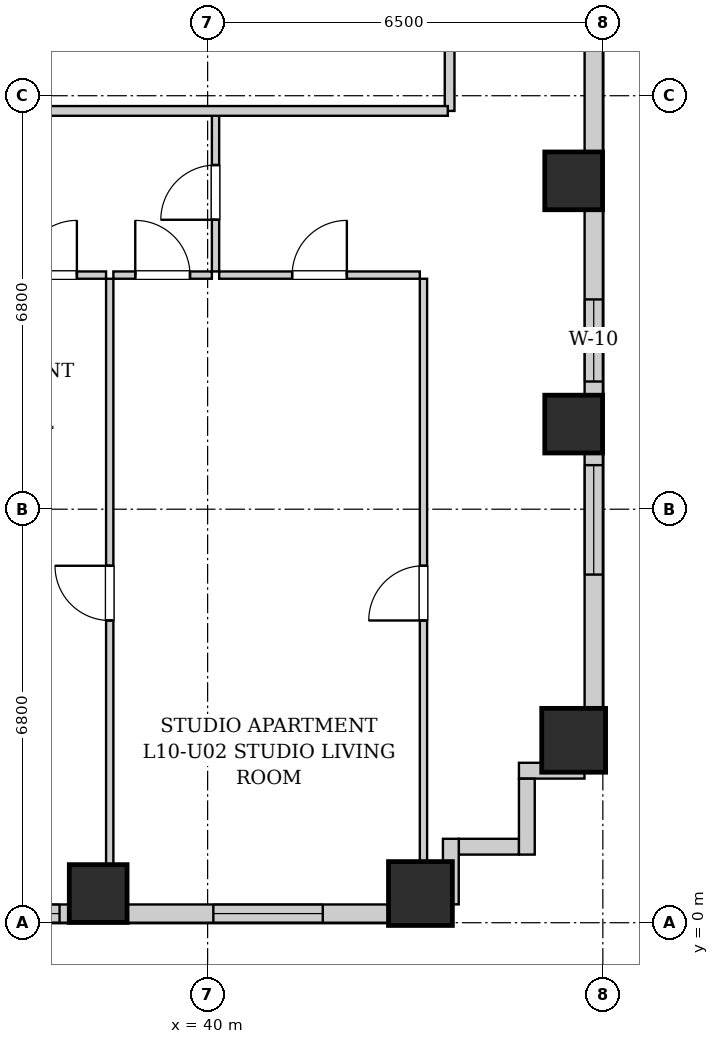
"""IFC4 building model, lengths in metres.
Left out: names, types, materials, properties, quantities, classifications, styles, units other than length and angle.
Written with IfcOpenShell. Run it as: python <this file> out.ifc"""

import sys

from ifc_helpers import new_model, si_unit, direction, frame, frame_2d, origin, origin_2d, place, context, subcontext, project, spatial, rectangle, extrude, element, fill, save


model = new_model("IFC4")
c1 = context("Model", 3, precision=1e-05, world=origin(), true_north=direction((0.0, 1.0)))
c2 = subcontext(c1, "Body", "Model", "MODEL_VIEW")
j1 = project(units=[si_unit("LENGTHUNIT", "METRE"), si_unit("PLANEANGLEUNIT", "RADIAN")], contexts=[c1])
p1 = place(None, origin())
s1 = spatial("IfcSite", under=j1, at=p1, CompositionType="ELEMENT")
p2 = place(p1, origin())
s2 = spatial("IfcBuilding", under=s1, at=p2, CompositionType="ELEMENT")
p3 = place(p2, frame((0.0, 0.0, 41.8)))
s3 = spatial("IfcBuildingStorey", under=s2, at=p3, CompositionType="ELEMENT", Elevation=41.8)
p4 = place(p3, frame((38.2, 0.48, 0.0), z_axis=(0.0, 0.0, 1.0), x_axis=(1.0, 0.0, 0.0)))
e1 = element("IfcColumn", 1, at=p4, inside=s3, PredefinedType="COLUMN", context=c2, shape_type="SweptSolid", body=[
    extrude(rectangle(XDim=0.95, YDim=0.95, at=origin_2d()), origin(), (0.0, 0.0, 1.0), 3.2),
])
for number, where, z_axis, x_axis in (
    (2, (43.5, 0.48, 0.0), (0.0, 0.0, 1.0), (1.0, 0.0, 0.0)),
    (3, (46.02, 3.0, 0.0), (0.0, 0.0, 1.0), (1.0, 0.0, 0.0)),
):
    element("IfcColumn", number, at=place(p3, frame(where, z_axis=z_axis, x_axis=x_axis)), inside=s3, PredefinedType="COLUMN", context=c2, shape_type="SweptSolid", body=[
        extrude(rectangle(XDim=1.05, YDim=1.05, at=origin_2d()), origin(), (0.0, 0.0, 1.0), 3.2),
    ])
for number, where, z_axis, x_axis in (
    (4, (46.02, 8.2, 0.0), (0.0, 0.0, 1.0), (1.0, 0.0, 0.0)),
    (5, (46.02, 12.2, 0.0), (0.0, 0.0, 1.0), (1.0, 0.0, 0.0)),
):
    element("IfcColumn", number, at=place(p3, frame(where, z_axis=z_axis, x_axis=x_axis)), inside=s3, PredefinedType="COLUMN", context=c2, shape_type="SweptSolid", body=[
        extrude(rectangle(XDim=0.95, YDim=0.95, at=origin_2d()), origin(), (0.0, 0.0, 1.0), 3.2),
    ])
p5 = place(p3, frame((46.35, 45.1, 0.0), z_axis=(0.0, 0.0, 1.0), x_axis=(0.0, -1.0, 0.0)))
e6 = element("IfcWall", 6, at=p5, inside=s3, PredefinedType="SOLIDWALL", context=c2, shape_type="SweptSolid", body=[
    extrude(rectangle(XDim=42.6, YDim=0.3, at=frame_2d((21.3, 0.0))), origin(), (0.0, 0.0, 1.0), 1.975),
])
p6 = place(p5, frame((37.575, 0.0, 0.55)))
e7 = element("IfcOpeningElement", 7, at=p6, cuts=e6, PredefinedType="OPENING", context=c2, shape_type="SweptSolid", body=[
    extrude(rectangle(XDim=1.8, YDim=1.2, at=frame_2d((0.9, 0.6))), frame((0.0, 0.16, 0.0), z_axis=(0.0, -1.0, 0.0), x_axis=(1.0, 0.0, 0.0)), (0.0, 0.0, 1.0), 0.32),
])
p7 = place(p5, frame((34.85, 0.0, 0.55)))
e8 = element("IfcOpeningElement", 8, at=p7, cuts=e6, PredefinedType="OPENING", context=c2, shape_type="SweptSolid", body=[
    extrude(rectangle(XDim=1.35, YDim=1.2, at=frame_2d((0.675, 0.6))), frame((0.0, 0.16, 0.0), z_axis=(0.0, -1.0, 0.0), x_axis=(1.0, 0.0, 0.0)), (0.0, 0.0, 1.0), 0.32),
])
p8 = place(p5, frame((3.665, 0.0, 0.55)))
e9 = element("IfcOpeningElement", 9, at=p8, cuts=e6, PredefinedType="OPENING", context=c2, shape_type="SweptSolid", body=[
    extrude(rectangle(XDim=1.8, YDim=1.2, at=frame_2d((0.9, 0.6))), frame((0.0, 0.16, 0.0), z_axis=(0.0, -1.0, 0.0), x_axis=(1.0, 0.0, 0.0)), (0.0, 0.0, 1.0), 0.32),
])
p9 = place(p5, frame((1.185, 0.0, 0.55)))
e10 = element("IfcOpeningElement", 10, at=p9, cuts=e6, PredefinedType="OPENING", context=c2, shape_type="SweptSolid", body=[
    extrude(rectangle(XDim=1.35, YDim=1.2, at=frame_2d((0.675, 0.6))), frame((0.0, 0.16, 0.0), z_axis=(0.0, -1.0, 0.0), x_axis=(1.0, 0.0, 0.0)), (0.0, 0.0, 1.0), 0.32),
])
p10 = place(p5, frame((27.225, 0.0, 0.55)))
e11 = element("IfcOpeningElement", 11, at=p10, cuts=e6, PredefinedType="OPENING", context=c2, shape_type="SweptSolid", body=[
    extrude(rectangle(XDim=1.8, YDim=1.2, at=frame_2d((0.9, 0.6))), frame((0.0, 0.16, 0.0), z_axis=(0.0, -1.0, 0.0), x_axis=(1.0, 0.0, 0.0)), (0.0, 0.0, 1.0), 0.32),
])
p11 = place(p5, frame((17.1, 0.0, 0.55)))
e12 = element("IfcOpeningElement", 12, at=p11, cuts=e6, PredefinedType="OPENING", context=c2, shape_type="SweptSolid", body=[
    extrude(rectangle(XDim=1.8, YDim=1.2, at=frame_2d((0.9, 0.6))), frame((0.0, 0.16, 0.0), z_axis=(0.0, -1.0, 0.0), x_axis=(1.0, 0.0, 0.0)), (0.0, 0.0, 1.0), 0.32),
])
p12 = place(p3, frame((44.0, 0.15, 0.0), z_axis=(0.0, 0.0, 1.0), x_axis=(-1.0, 0.0, 0.0)))
e13 = element("IfcWall", 13, at=p12, inside=s3, PredefinedType="SOLIDWALL", context=c2, shape_type="SweptSolid", body=[
    extrude(rectangle(XDim=25.7, YDim=0.3, at=frame_2d((12.85, 0.0))), origin(), (0.0, 0.0, 1.0), 1.975),
])
p13 = place(p12, frame((22.471, 0.0, 0.55)))
e14 = element("IfcOpeningElement", 14, at=p13, cuts=e13, PredefinedType="OPENING", context=c2, shape_type="SweptSolid", body=[
    extrude(rectangle(XDim=1.8, YDim=1.2, at=frame_2d((0.9, 0.6))), frame((0.0, 0.16, 0.0), z_axis=(0.0, -1.0, 0.0), x_axis=(1.0, 0.0, 0.0)), (0.0, 0.0, 1.0), 0.32),
])
p14 = place(p12, frame((15.65, 0.0, 0.55)))
e15 = element("IfcOpeningElement", 15, at=p14, cuts=e13, PredefinedType="OPENING", context=c2, shape_type="SweptSolid", body=[
    extrude(rectangle(XDim=0.85, YDim=1.2, at=frame_2d((0.425, 0.6))), frame((0.0, 0.16, 0.0), z_axis=(0.0, -1.0, 0.0), x_axis=(1.0, 0.0, 0.0)), (0.0, 0.0, 1.0), 0.32),
])
p15 = place(p12, frame((12.777, 0.0, 0.55)))
e16 = element("IfcOpeningElement", 16, at=p15, cuts=e13, PredefinedType="OPENING", context=c2, shape_type="SweptSolid", body=[
    extrude(rectangle(XDim=1.8, YDim=1.2, at=frame_2d((0.9, 0.6))), frame((0.0, 0.16, 0.0), z_axis=(0.0, -1.0, 0.0), x_axis=(1.0, 0.0, 0.0)), (0.0, 0.0, 1.0), 0.32),
])
p16 = place(p12, frame((9.315, 0.0, 0.55)))
e17 = element("IfcOpeningElement", 17, at=p16, cuts=e13, PredefinedType="OPENING", context=c2, shape_type="SweptSolid", body=[
    extrude(rectangle(XDim=0.85, YDim=1.2, at=frame_2d((0.425, 0.6))), frame((0.0, 0.16, 0.0), z_axis=(0.0, -1.0, 0.0), x_axis=(1.0, 0.0, 0.0)), (0.0, 0.0, 1.0), 0.32),
])
p17 = place(p12, frame((6.435, 0.0, 0.55)))
e18 = element("IfcOpeningElement", 18, at=p17, cuts=e13, PredefinedType="OPENING", context=c2, shape_type="SweptSolid", body=[
    extrude(rectangle(XDim=1.8, YDim=1.2, at=frame_2d((0.9, 0.6))), frame((0.0, 0.16, 0.0), z_axis=(0.0, -1.0, 0.0), x_axis=(1.0, 0.0, 0.0)), (0.0, 0.0, 1.0), 0.32),
])
p18 = place(p12, frame((2.106, 0.0, 0.55)))
e19 = element("IfcOpeningElement", 19, at=p18, cuts=e13, PredefinedType="OPENING", context=c2, shape_type="SweptSolid", body=[
    extrude(rectangle(XDim=1.8, YDim=1.2, at=frame_2d((0.9, 0.6))), frame((0.0, 0.16, 0.0), z_axis=(0.0, -1.0, 0.0), x_axis=(1.0, 0.0, 0.0)), (0.0, 0.0, 1.0), 0.32),
])
p19 = place(p3, frame((46.198, 2.5, 0.0), z_axis=(0.0, 0.0, 1.0), x_axis=(-1.0, 0.0, 0.0)))
e20 = element("IfcWall", 20, at=p19, inside=s3, PredefinedType="SOLIDWALL", context=c2, shape_type="SweptSolid", body=[
    extrude(rectangle(XDim=1.078, YDim=0.26, at=frame_2d((0.539, 0.0))), origin(), (0.0, 0.0, 1.0), 2.94),
])
p20 = place(p3, frame((45.25, 2.368, 0.0), z_axis=(0.0, 0.0, 1.0), x_axis=(0.0, -1.0, 0.0)))
e21 = element("IfcWall", 21, at=p20, inside=s3, PredefinedType="SOLIDWALL", context=c2, shape_type="SweptSolid", body=[
    extrude(rectangle(XDim=1.248, YDim=0.26, at=frame_2d((0.624, 0.0))), origin(), (0.0, 0.0, 1.0), 2.94),
])
p21 = place(p3, frame((45.118, 1.25, 0.0), z_axis=(0.0, 0.0, 1.0), x_axis=(-1.0, 0.0, 0.0)))
e22 = element("IfcWall", 22, at=p21, inside=s3, PredefinedType="SOLIDWALL", context=c2, shape_type="SweptSolid", body=[
    extrude(rectangle(XDim=0.986, YDim=0.26, at=frame_2d((0.493, 0.0))), origin(), (0.0, 0.0, 1.0), 2.94),
])
p22 = place(p3, frame((44.0, 1.38, 0.0), z_axis=(0.0, 0.0, 1.0), x_axis=(0.0, -1.0, 0.0)))
e23 = element("IfcWall", 23, at=p22, inside=s3, PredefinedType="SOLIDWALL", context=c2, shape_type="SweptSolid", body=[
    extrude(rectangle(XDim=1.078, YDim=0.26, at=frame_2d((0.539, 0.0))), origin(), (0.0, 0.0, 1.0), 2.94),
])
p23 = place(p3, frame((43.98, 13.35, 0.0), z_axis=(0.0, 0.0, 1.0), x_axis=(0.0, 1.0, 0.0)))
e24 = element("IfcWall", 24, at=p23, inside=s3, PredefinedType="PARTITIONING", context=c2, shape_type="SweptSolid", body=[
    extrude(rectangle(XDim=1.74, YDim=0.16, at=frame_2d((0.87, 0.0))), origin(), (0.0, 0.0, 1.0), 2.94),
])
p24 = place(p3, frame((40.13, 10.71, 0.0), z_axis=(0.0, 0.0, 1.0), x_axis=(0.0, 1.0, 0.0)))
e25 = element("IfcWall", 25, at=p24, inside=s3, PredefinedType="PARTITIONING", context=c2, shape_type="SweptSolid", body=[
    extrude(rectangle(XDim=2.6, YDim=0.12, at=frame_2d((1.3, 0.0))), origin(), (0.0, 0.0, 1.0), 2.94),
])
p25 = place(p24, frame((0.85, 0.0, 0.0)))
e26 = element("IfcOpeningElement", 26, at=p25, cuts=e25, PredefinedType="OPENING", context=c2, shape_type="SweptSolid", body=[
    extrude(rectangle(XDim=0.9, YDim=2.05, at=frame_2d((0.45, 1.025))), frame((0.0, 0.07, 0.0), z_axis=(0.0, -1.0, 0.0), x_axis=(1.0, 0.0, 0.0)), (0.0, 0.0, 1.0), 0.14),
])
p26 = place(p3, frame((36.47, 10.65, 0.0), z_axis=(0.0, 0.0, 1.0), x_axis=(1.0, 0.0, 0.0)))
e27 = element("IfcWall", 27, at=p26, inside=s3, PredefinedType="PARTITIONING", context=c2, shape_type="SweptSolid", body=[
    extrude(rectangle(XDim=1.86, YDim=0.12, at=frame_2d((0.93, 0.0))), origin(), (0.0, 0.0, 1.0), 2.94),
])
p27 = place(p26, frame((0.48, 0.0, 0.0)))
e28 = element("IfcOpeningElement", 28, at=p27, cuts=e27, PredefinedType="OPENING", context=c2, shape_type="SweptSolid", body=[
    extrude(rectangle(XDim=0.9, YDim=2.05, at=frame_2d((0.45, 1.025))), frame((0.0, 0.07, 0.0), z_axis=(0.0, -1.0, 0.0), x_axis=(1.0, 0.0, 0.0)), (0.0, 0.0, 1.0), 0.14),
])
p28 = place(p3, frame((38.45, 10.65, 0.0), z_axis=(0.0, 0.0, 1.0), x_axis=(1.0, 0.0, 0.0)))
e29 = element("IfcWall", 29, at=p28, inside=s3, PredefinedType="PARTITIONING", context=c2, shape_type="SweptSolid", body=[
    extrude(rectangle(XDim=1.62, YDim=0.12, at=frame_2d((0.81, 0.0))), origin(), (0.0, 0.0, 1.0), 2.94),
])
p29 = place(p28, frame((0.36, 0.0, 0.0)))
e30 = element("IfcOpeningElement", 30, at=p29, cuts=e29, PredefinedType="OPENING", context=c2, shape_type="SweptSolid", body=[
    extrude(rectangle(XDim=0.9, YDim=2.05, at=frame_2d((0.45, 1.025))), frame((0.0, 0.07, 0.0), z_axis=(0.0, -1.0, 0.0), x_axis=(1.0, 0.0, 0.0)), (0.0, 0.0, 1.0), 0.14),
])
p30 = place(p3, frame((40.19, 10.65, 0.0), z_axis=(0.0, 0.0, 1.0), x_axis=(1.0, 0.0, 0.0)))
e31 = element("IfcWall", 31, at=p30, inside=s3, PredefinedType="PARTITIONING", context=c2, shape_type="SweptSolid", body=[
    extrude(rectangle(XDim=3.3, YDim=0.12, at=frame_2d((1.65, 0.0))), origin(), (0.0, 0.0, 1.0), 2.94),
])
p31 = place(p30, frame((1.2, 0.0, 0.0)))
e32 = element("IfcOpeningElement", 32, at=p31, cuts=e31, PredefinedType="OPENING", context=c2, shape_type="SweptSolid", body=[
    extrude(rectangle(XDim=0.9, YDim=2.05, at=frame_2d((0.45, 1.025))), frame((0.0, 0.07, 0.0), z_axis=(0.0, -1.0, 0.0), x_axis=(1.0, 0.0, 0.0)), (0.0, 0.0, 1.0), 0.14),
])
p32 = place(p3, frame((38.39, 0.28, 0.0), z_axis=(0.0, 0.0, 1.0), x_axis=(0.0, 1.0, 0.0)))
e33 = element("IfcWall", 33, at=p32, inside=s3, PredefinedType="PARTITIONING", context=c2, shape_type="SweptSolid", body=[
    extrude(rectangle(XDim=10.31, YDim=0.12, at=frame_2d((5.155, 0.0))), origin(), (0.0, 0.0, 1.0), 2.94),
])
p33 = place(p32, frame((4.69, 0.0, 0.0)))
e34 = element("IfcOpeningElement", 34, at=p33, cuts=e33, PredefinedType="OPENING", context=c2, shape_type="SweptSolid", body=[
    extrude(rectangle(XDim=0.9, YDim=2.05, at=frame_2d((0.45, 1.025))), frame((0.0, 0.07, 0.0), z_axis=(0.0, -1.0, 0.0), x_axis=(1.0, 0.0, 0.0)), (0.0, 0.0, 1.0), 0.14),
])
p34 = place(p3, frame((43.55, 0.28, 0.0), z_axis=(0.0, 0.0, 1.0), x_axis=(0.0, 1.0, 0.0)))
e35 = element("IfcWall", 35, at=p34, inside=s3, PredefinedType="PARTITIONING", context=c2, shape_type="SweptSolid", body=[
    extrude(rectangle(XDim=10.31, YDim=0.12, at=frame_2d((5.155, 0.0))), origin(), (0.0, 0.0, 1.0), 2.94),
])
p35 = place(p34, frame((4.69, 0.0, 0.0)))
e36 = element("IfcOpeningElement", 36, at=p35, cuts=e35, PredefinedType="OPENING", context=c2, shape_type="SweptSolid", body=[
    extrude(rectangle(XDim=0.9, YDim=2.05, at=frame_2d((0.45, 1.025))), frame((0.0, 0.07, 0.0), z_axis=(0.0, -1.0, 0.0), x_axis=(1.0, 0.0, 0.0)), (0.0, 0.0, 1.0), 0.14),
])
p36 = place(p3, frame((10.05, 13.35, 0.0), z_axis=(0.0, 0.0, 1.0), x_axis=(1.0, 0.0, 0.0)))
e37 = element("IfcWall", 37, at=p36, inside=s3, PredefinedType="PARTITIONING", context=c2, shape_type="SweptSolid", body=[
    extrude(rectangle(XDim=33.9, YDim=0.16, at=frame_2d((16.95, 0.0))), origin(), (0.0, 0.0, 1.0), 2.94),
])
p37 = place(p36, frame((3.8, 0.0, 0.0)))
e38 = element("IfcOpeningElement", 38, at=p37, cuts=e37, PredefinedType="OPENING", context=c2, shape_type="SweptSolid", body=[
    extrude(rectangle(XDim=0.95, YDim=2.1, at=frame_2d((0.475, 1.05))), frame((0.0, 0.09, 0.0), z_axis=(0.0, -1.0, 0.0), x_axis=(1.0, 0.0, 0.0)), (0.0, 0.0, 1.0), 0.18),
])
p38 = place(p36, frame((13.345, 0.0, 0.0)))
e39 = element("IfcOpeningElement", 39, at=p38, cuts=e37, PredefinedType="OPENING", context=c2, shape_type="SweptSolid", body=[
    extrude(rectangle(XDim=0.95, YDim=2.1, at=frame_2d((0.475, 1.05))), frame((0.0, 0.09, 0.0), z_axis=(0.0, -1.0, 0.0), x_axis=(1.0, 0.0, 0.0)), (0.0, 0.0, 1.0), 0.18),
])
p39 = place(p25, origin())
e40 = element("IfcDoor", 40, at=p39, inside=s3, OperationType="SINGLE_SWING_LEFT", PredefinedType="DOOR", context=c2, shape_type="SweptSolid", body=[
    extrude(rectangle(XDim=0.9, YDim=2.05, at=frame_2d((0.45, 1.025))), frame((0.0, 0.025, 0.0), z_axis=(0.0, -1.0, 0.0), x_axis=(1.0, 0.0, 0.0)), (0.0, 0.0, 1.0), 0.05),
])
fill(e26, e40)
p40 = place(p27, origin())
e41 = element("IfcDoor", 41, at=p40, inside=s3, OperationType="SINGLE_SWING_RIGHT", PredefinedType="DOOR", context=c2, shape_type="SweptSolid", body=[
    extrude(rectangle(XDim=0.9, YDim=2.05, at=frame_2d((0.45, 1.025))), frame((0.0, 0.025, 0.0), z_axis=(0.0, -1.0, 0.0), x_axis=(1.0, 0.0, 0.0)), (0.0, 0.0, 1.0), 0.05),
])
fill(e28, e41)
p41 = place(p29, origin())
e42 = element("IfcDoor", 42, at=p41, inside=s3, OperationType="SINGLE_SWING_LEFT", PredefinedType="DOOR", context=c2, shape_type="SweptSolid", body=[
    extrude(rectangle(XDim=0.9, YDim=2.05, at=frame_2d((0.45, 1.025))), frame((0.0, 0.025, 0.0), z_axis=(0.0, -1.0, 0.0), x_axis=(1.0, 0.0, 0.0)), (0.0, 0.0, 1.0), 0.05),
])
fill(e30, e42)
p42 = place(p31, origin())
e43 = element("IfcDoor", 43, at=p42, inside=s3, OperationType="SINGLE_SWING_RIGHT", PredefinedType="DOOR", context=c2, shape_type="SweptSolid", body=[
    extrude(rectangle(XDim=0.9, YDim=2.05, at=frame_2d((0.45, 1.025))), frame((0.0, 0.025, 0.0), z_axis=(0.0, -1.0, 0.0), x_axis=(1.0, 0.0, 0.0)), (0.0, 0.0, 1.0), 0.05),
])
fill(e32, e43)
p43 = place(p33, origin())
e44 = element("IfcDoor", 44, at=p43, inside=s3, OperationType="SINGLE_SWING_RIGHT", PredefinedType="DOOR", context=c2, shape_type="SweptSolid", body=[
    extrude(rectangle(XDim=0.9, YDim=2.05, at=frame_2d((0.45, 1.025))), frame((0.0, 0.025, 0.0), z_axis=(0.0, -1.0, 0.0), x_axis=(1.0, 0.0, 0.0)), (0.0, 0.0, 1.0), 0.05),
])
fill(e34, e44)
p44 = place(p35, origin())
e45 = element("IfcDoor", 45, at=p44, inside=s3, OperationType="SINGLE_SWING_LEFT", PredefinedType="DOOR", context=c2, shape_type="SweptSolid", body=[
    extrude(rectangle(XDim=0.9, YDim=2.05, at=frame_2d((0.45, 1.025))), frame((0.0, 0.025, 0.0), z_axis=(0.0, -1.0, 0.0), x_axis=(1.0, 0.0, 0.0)), (0.0, 0.0, 1.0), 0.05),
])
fill(e36, e45)
p45 = place(p17, origin())
e46 = element("IfcWindow", 46, at=p45, inside=s3, PartitioningType="DOUBLE_PANEL_VERTICAL", PredefinedType="WINDOW", context=c2, shape_type="SweptSolid", body=[
    extrude(rectangle(XDim=1.8, YDim=1.2, at=frame_2d((0.9, 0.6))), frame((0.0, 0.03, 0.0), z_axis=(0.0, -1.0, 0.0), x_axis=(1.0, 0.0, 0.0)), (0.0, 0.0, 1.0), 0.06),
])
fill(e18, e46)
p46 = place(p18, origin())
e47 = element("IfcWindow", 47, at=p46, inside=s3, PartitioningType="DOUBLE_PANEL_VERTICAL", PredefinedType="WINDOW", context=c2, shape_type="SweptSolid", body=[
    extrude(rectangle(XDim=1.8, YDim=1.2, at=frame_2d((0.9, 0.6))), frame((0.0, 0.03, 0.0), z_axis=(0.0, -1.0, 0.0), x_axis=(1.0, 0.0, 0.0)), (0.0, 0.0, 1.0), 0.06),
])
fill(e19, e47)
p47 = place(p6, origin())
e48 = element("IfcWindow", 48, at=p47, inside=s3, PartitioningType="DOUBLE_PANEL_VERTICAL", PredefinedType="WINDOW", context=c2, shape_type="SweptSolid", body=[
    extrude(rectangle(XDim=1.8, YDim=1.2, at=frame_2d((0.9, 0.6))), frame((0.0, 0.03, 0.0), z_axis=(0.0, -1.0, 0.0), x_axis=(1.0, 0.0, 0.0)), (0.0, 0.0, 1.0), 0.06),
])
fill(e7, e48)
p48 = place(p7, origin())
e49 = element("IfcWindow", 49, at=p48, inside=s3, PartitioningType="SINGLE_PANEL", PredefinedType="WINDOW", context=c2, shape_type="SweptSolid", body=[
    extrude(rectangle(XDim=1.35, YDim=1.2, at=frame_2d((0.675, 0.6))), frame((0.0, 0.03, 0.0), z_axis=(0.0, -1.0, 0.0), x_axis=(1.0, 0.0, 0.0)), (0.0, 0.0, 1.0), 0.06),
])
fill(e8, e49)
save(model, sys.argv[1])
